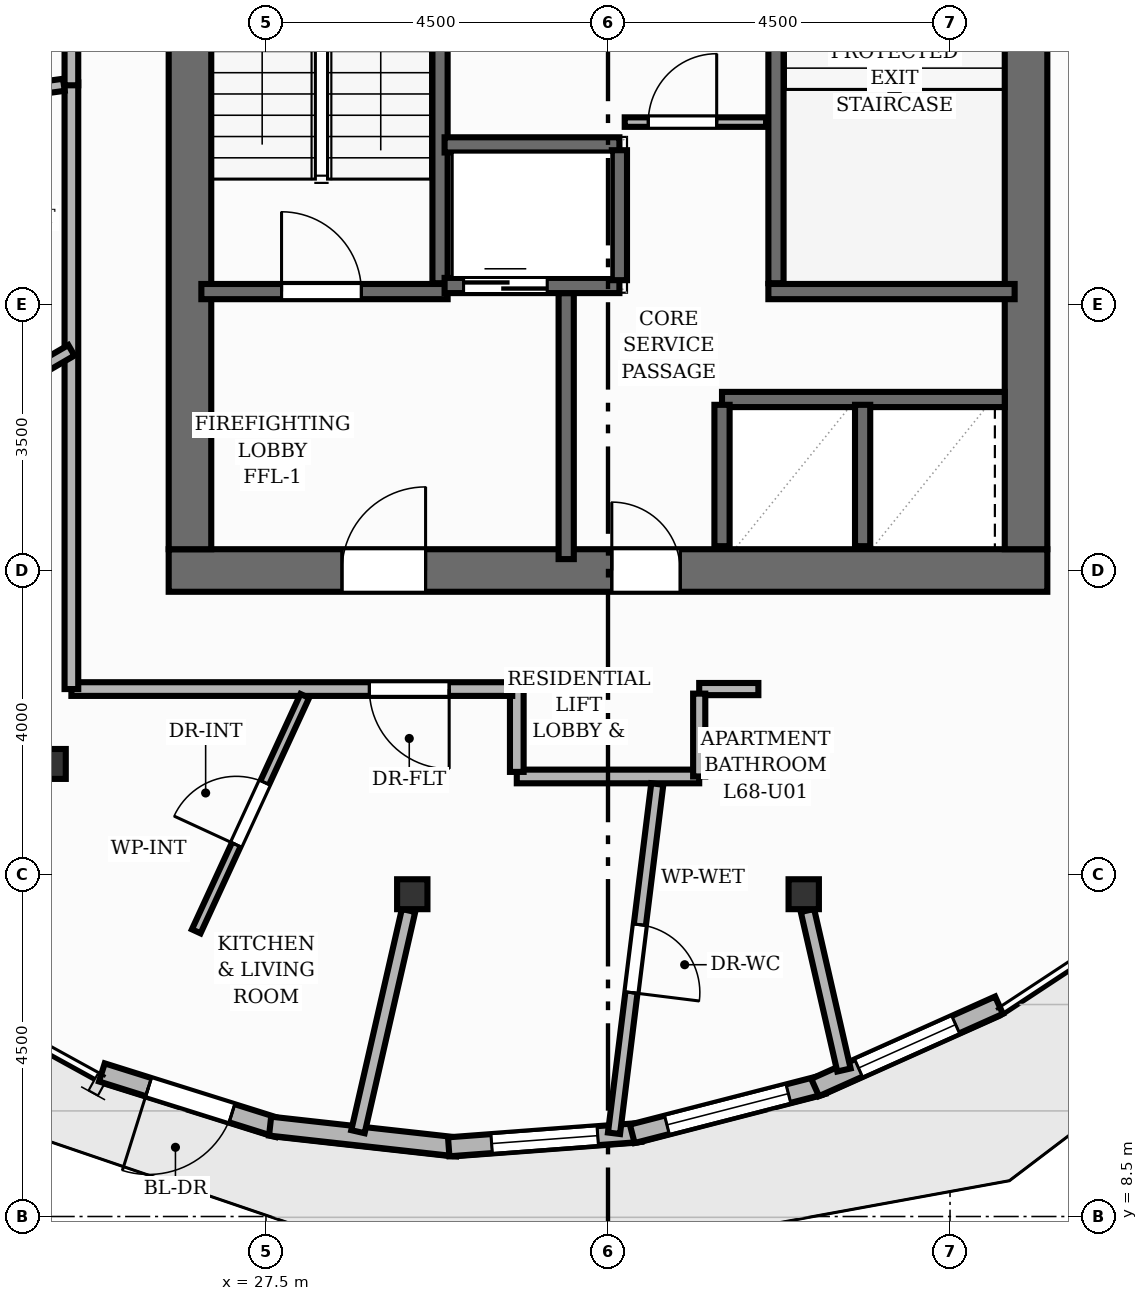
"""IFC4 building model, lengths in metres.
Left out: names, types, materials, properties, quantities, classifications, styles, units other than length and angle.
Written with IfcOpenShell. Run it as: python <this file> out.ifc"""

import sys

from ifc_helpers import new_model, si_unit, direction, frame, frame_2d, origin, origin_2d, place, context, subcontext, project, spatial, rectangle, i_section, extrude, element, fill, save


model = new_model("IFC4")
c1 = context("Model", 3, precision=1e-05, world=origin(), true_north=direction((0.0, 1.0)))
c2 = subcontext(c1, "Body", "Model", "MODEL_VIEW")
j1 = project(units=[si_unit("LENGTHUNIT", "METRE"), si_unit("PLANEANGLEUNIT", "RADIAN")], contexts=[c1])
p1 = place(None, origin())
s1 = spatial("IfcSite", under=j1, at=p1, CompositionType="ELEMENT")
p2 = place(p1, origin())
s2 = spatial("IfcBuilding", under=s1, at=p2, CompositionType="ELEMENT")
p3 = place(p2, frame((0.0, 0.0, 227.04)))
s3 = spatial("IfcBuildingStorey", under=s2, at=p3, CompositionType="ELEMENT", Elevation=227.04)
p4 = place(p3, frame((26.22, 17.0, 0.0), z_axis=(0.0, 0.0, 1.0), x_axis=(1.0, 0.0, 0.0)))
e1 = element("IfcWall", 1, at=p4, inside=s3, PredefinedType="SHEAR", context=c2, shape_type="SweptSolid", body=[
    extrude(rectangle(XDim=11.56, YDim=0.56, at=frame_2d((5.78, 0.0))), origin(), (0.0, 0.0, 1.0), 3.2),
])
p5 = place(p4, frame((2.28, 0.0, 0.0)))
e2 = element("IfcOpeningElement", 2, at=p5, cuts=e1, PredefinedType="OPENING", context=c2, shape_type="SweptSolid", body=[
    extrude(rectangle(XDim=1.1, YDim=2.15, at=frame_2d((0.55, 1.075))), frame((0.0, 0.29, 0.0), z_axis=(0.0, -1.0, 0.0), x_axis=(1.0, 0.0, 0.0)), (0.0, 0.0, 1.0), 0.58),
])
p6 = place(p4, frame((5.83, 0.0, 0.0)))
e3 = element("IfcOpeningElement", 3, at=p6, cuts=e1, PredefinedType="OPENING", context=c2, shape_type="SweptSolid", body=[
    extrude(rectangle(XDim=0.9, YDim=2.1, at=frame_2d((0.45, 1.05))), frame((0.0, 0.29, 0.0), z_axis=(0.0, -1.0, 0.0), x_axis=(1.0, 0.0, 0.0)), (0.0, 0.0, 1.0), 0.58),
])
for number, where, z_axis, x_axis in (
    (4, (26.5, 17.28, 0.0), (0.0, 0.0, 1.0), (0.0, 1.0, 0.0)),
    (5, (37.5, 17.28, 0.0), (0.0, 0.0, 1.0), (0.0, 1.0, 0.0)),
):
    element("IfcWall", number, at=place(p3, frame(where, z_axis=z_axis, x_axis=x_axis)), inside=s3, PredefinedType="SHEAR", context=c2, shape_type="SweptSolid", body=[
        extrude(rectangle(XDim=13.44, YDim=0.56, at=frame_2d((6.72, 0.0))), origin(), (0.0, 0.0, 1.0), 3.2),
    ])
for number, where, z_axis, x_axis in (
    (6, (24.667, 14.455, 0.0), (0.0, 0.0, 1.0), (1.0, 0.0, 0.0)),
    (7, (29.425, 12.74, 0.0), (0.0, 0.0, 1.0), (1.0, 0.0, 0.0)),
    (8, (34.575, 12.74, 0.0), (0.0, 0.0, 1.0), (1.0, 0.0, 0.0)),
):
    element("IfcColumn", number, at=place(p3, frame(where, z_axis=z_axis, x_axis=x_axis)), inside=s3, PredefinedType="COLUMN", context=c2, shape_type="SweptSolid", body=[
        extrude(i_section(OverallWidth=0.399, OverallDepth=0.394, WebThickness=0.023, FlangeThickness=0.037, at=origin_2d()), origin(), (0.0, 0.0, 1.0), 3.2),
    ])
p7 = place(p3, frame((27.666, 9.666, 0.0), z_axis=(0.0, 0.0, 1.0), x_axis=(-0.95407801166, 0.299558254212, 0.0)))
e9 = element("IfcWall", 9, at=p7, inside=s3, PredefinedType="SOLIDWALL", context=c2, shape_type="SweptSolid", body=[
    extrude(rectangle(XDim=2.437, YDim=0.25, at=frame_2d((1.218, 0.0))), origin(), (0.0, 0.0, 1.0), 2.96),
])
p8 = place(p7, frame((0.643, 0.0, 0.0)))
e10 = element("IfcOpeningElement", 10, at=p8, cuts=e9, PredefinedType="OPENING", context=c2, shape_type="SweptSolid", body=[
    extrude(rectangle(XDim=1.15, YDim=2.2, at=frame_2d((0.575, 1.1))), frame((0.0, 0.135, 0.0), z_axis=(0.0, -1.0, 0.0), x_axis=(1.0, 0.0, 0.0)), (0.0, 0.0, 1.0), 0.27),
])
p9 = place(p3, frame((30.017, 9.415, 0.0), z_axis=(0.0, 0.0, 1.0), x_axis=(-0.993859679734, 0.110647806121, 0.0)))
e11 = element("IfcWall", 11, at=p9, inside=s3, PredefinedType="SOLIDWALL", context=c2, shape_type="SweptSolid", body=[
    extrude(rectangle(XDim=2.478, YDim=0.25, at=frame_2d((1.239, 0.0))), origin(), (0.0, 0.0, 1.0), 2.96),
])
p10 = place(p3, frame((32.429, 9.606, 0.0), z_axis=(0.0, 0.0, 1.0), x_axis=(-0.997203982256, -0.074727623888, 0.0)))
e12 = element("IfcWall", 12, at=p10, inside=s3, PredefinedType="SOLIDWALL", context=c2, shape_type="SweptSolid", body=[
    extrude(rectangle(XDim=2.532, YDim=0.25, at=frame_2d((1.266, 0.0))), origin(), (0.0, 0.0, 1.0), 2.96),
])
p11 = place(p10, frame((0.566, 0.0, 0.85)))
e13 = element("IfcOpeningElement", 13, at=p11, cuts=e12, PredefinedType="OPENING", context=c2, shape_type="SweptSolid", body=[
    extrude(rectangle(XDim=1.4, YDim=1.55, at=frame_2d((0.7, 0.775))), frame((0.0, 0.135, 0.0), z_axis=(0.0, -1.0, 0.0), x_axis=(1.0, 0.0, 0.0)), (0.0, 0.0, 1.0), 0.27),
])
p12 = place(p3, frame((34.829, 10.234, 0.0), z_axis=(0.0, 0.0, 1.0), x_axis=(-0.968423445169, -0.249311112562, 0.0)))
e14 = element("IfcWall", 14, at=p12, inside=s3, PredefinedType="SOLIDWALL", context=c2, shape_type="SweptSolid", body=[
    extrude(rectangle(XDim=2.592, YDim=0.25, at=frame_2d((1.296, 0.0))), origin(), (0.0, 0.0, 1.0), 2.96),
])
p13 = place(p12, frame((0.471, 0.0, 0.85)))
e15 = element("IfcOpeningElement", 15, at=p13, cuts=e14, PredefinedType="OPENING", context=c2, shape_type="SweptSolid", body=[
    extrude(rectangle(XDim=1.65, YDim=1.55, at=frame_2d((0.825, 0.775))), frame((0.0, 0.135, 0.0), z_axis=(0.0, -1.0, 0.0), x_axis=(1.0, 0.0, 0.0)), (0.0, 0.0, 1.0), 0.27),
])
p14 = place(p3, frame((37.145, 11.281, 0.0), z_axis=(0.0, 0.0, 1.0), x_axis=(-0.912779399898, -0.408452894617, 0.0)))
e16 = element("IfcWall", 16, at=p14, inside=s3, PredefinedType="SOLIDWALL", context=c2, shape_type="SweptSolid", body=[
    extrude(rectangle(XDim=2.651, YDim=0.25, at=frame_2d((1.325, 0.0))), origin(), (0.0, 0.0, 1.0), 2.96),
])
p15 = place(p14, frame((0.625, 0.0, 0.85)))
e17 = element("IfcOpeningElement", 17, at=p15, cuts=e16, PredefinedType="OPENING", context=c2, shape_type="SweptSolid", body=[
    extrude(rectangle(XDim=1.4, YDim=1.52, at=frame_2d((0.7, 0.76))), frame((0.0, 0.135, 0.0), z_axis=(0.0, -1.0, 0.0), x_axis=(1.0, 0.0, 0.0)), (0.0, 0.0, 1.0), 0.27),
])
p16 = place(p3, frame((29.79, 20.78, 0.0), z_axis=(0.0, 0.0, 1.0), x_axis=(0.0, 1.0, 0.0)))
e18 = element("IfcWall", 18, at=p16, inside=s3, PredefinedType="SHEAR", context=c2, shape_type="SweptSolid", body=[
    extrude(rectangle(XDim=6.44, YDim=0.2, at=frame_2d((3.22, 0.0))), origin(), (0.0, 0.0, 1.0), 3.2),
])
p17 = place(p3, frame((26.65, 20.67, 0.0), z_axis=(0.0, 0.0, 1.0), x_axis=(1.0, 0.0, 0.0)))
e19 = element("IfcWall", 19, at=p17, inside=s3, PredefinedType="SHEAR", context=c2, shape_type="SweptSolid", body=[
    extrude(rectangle(XDim=3.24, YDim=0.2, at=frame_2d((1.62, 0.0))), origin(), (0.0, 0.0, 1.0), 3.2),
])
p18 = place(p17, frame((1.055, 0.0, 0.0)))
e20 = element("IfcOpeningElement", 20, at=p18, cuts=e19, PredefinedType="OPENING", context=c2, shape_type="SweptSolid", body=[
    extrude(rectangle(XDim=1.05, YDim=2.15, at=frame_2d((0.525, 1.075))), frame((0.0, 0.11, 0.0), z_axis=(0.0, -1.0, 0.0), x_axis=(1.0, 0.0, 0.0)), (0.0, 0.0, 1.0), 0.22),
])
p19 = place(p3, frame((34.21, 20.78, 0.0), z_axis=(0.0, 0.0, 1.0), x_axis=(0.0, 1.0, 0.0)))
e21 = element("IfcWall", 21, at=p19, inside=s3, PredefinedType="SHEAR", context=c2, shape_type="SweptSolid", body=[
    extrude(rectangle(XDim=6.44, YDim=0.2, at=frame_2d((3.22, 0.0))), origin(), (0.0, 0.0, 1.0), 3.2),
])
p20 = place(p3, frame((34.11, 20.67, 0.0), z_axis=(0.0, 0.0, 1.0), x_axis=(1.0, 0.0, 0.0)))
e22 = element("IfcWall", 22, at=p20, inside=s3, PredefinedType="SHEAR", context=c2, shape_type="SweptSolid", body=[
    extrude(rectangle(XDim=3.24, YDim=0.2, at=frame_2d((1.62, 0.0))), origin(), (0.0, 0.0, 1.0), 3.2),
])
p21 = place(p3, frame((31.45, 17.15, 0.0), z_axis=(0.0, 0.0, 1.0), x_axis=(0.0, 1.0, 0.0)))
e23 = element("IfcWall", 23, at=p21, inside=s3, PredefinedType="SHEAR", context=c2, shape_type="SweptSolid", body=[
    extrude(rectangle(XDim=3.5, YDim=0.2, at=frame_2d((1.75, 0.0))), origin(), (0.0, 0.0, 1.0), 3.2),
])
p22 = place(p3, frame((29.85, 20.75, 0.0), z_axis=(0.0, 0.0, 1.0), x_axis=(1.0, 0.0, 0.0)))
e24 = element("IfcWall", 24, at=p22, inside=s3, PredefinedType="SHEAR", context=c2, shape_type="SweptSolid", body=[
    extrude(rectangle(XDim=2.3, YDim=0.2, at=frame_2d((1.15, 0.0))), origin(), (0.0, 0.0, 1.0), 3.2),
])
p23 = place(p22, frame((0.25, 0.0, 0.0)))
e25 = element("IfcOpeningElement", 25, at=p23, cuts=e24, PredefinedType="OPENING", context=c2, shape_type="SweptSolid", body=[
    extrude(rectangle(XDim=1.1, YDim=2.15, at=frame_2d((0.55, 1.075))), frame((0.0, 0.11, 0.0), z_axis=(0.0, -1.0, 0.0), x_axis=(1.0, 0.0, 0.0)), (0.0, 0.0, 1.0), 0.22),
])
p24 = place(p3, frame((29.85, 22.6, 0.0), z_axis=(0.0, 0.0, 1.0), x_axis=(1.0, 0.0, 0.0)))
e26 = element("IfcWall", 26, at=p24, inside=s3, PredefinedType="SHEAR", context=c2, shape_type="SweptSolid", body=[
    extrude(rectangle(XDim=2.3, YDim=0.2, at=frame_2d((1.15, 0.0))), origin(), (0.0, 0.0, 1.0), 3.2),
])
p25 = place(p3, frame((32.15, 20.82, 0.0), z_axis=(0.0, 0.0, 1.0), x_axis=(0.0, 1.0, 0.0)))
e27 = element("IfcWall", 27, at=p25, inside=s3, PredefinedType="SHEAR", context=c2, shape_type="SweptSolid", body=[
    extrude(rectangle(XDim=1.71, YDim=0.2, at=frame_2d((0.855, 0.0))), origin(), (0.0, 0.0, 1.0), 3.2),
])
p26 = place(p3, frame((33.5, 19.25, 0.0), z_axis=(0.0, 0.0, 1.0), x_axis=(1.0, 0.0, 0.0)))
e28 = element("IfcWall", 28, at=p26, inside=s3, PredefinedType="SHEAR", context=c2, shape_type="SweptSolid", body=[
    extrude(rectangle(XDim=3.72, YDim=0.2, at=frame_2d((1.86, 0.0))), origin(), (0.0, 0.0, 1.0), 3.2),
])
for number, where, z_axis, x_axis in (
    (29, (33.5, 17.32, 0.0), (0.0, 0.0, 1.0), (0.0, 1.0, 0.0)),
    (30, (35.35, 17.32, 0.0), (0.0, 0.0, 1.0), (0.0, 1.0, 0.0)),
):
    element("IfcWall", number, at=place(p3, frame(where, z_axis=z_axis, x_axis=x_axis)), inside=s3, PredefinedType="SHEAR", context=c2, shape_type="SweptSolid", body=[
        extrude(rectangle(XDim=1.86, YDim=0.2, at=frame_2d((0.93, 0.0))), origin(), (0.0, 0.0, 1.0), 3.2),
    ])
p27 = place(p3, frame((32.22, 22.9, 0.0), z_axis=(0.0, 0.0, 1.0), x_axis=(1.0, 0.0, 0.0)))
e31 = element("IfcWall", 31, at=p27, inside=s3, PredefinedType="PARTITIONING", context=c2, shape_type="SweptSolid", body=[
    extrude(rectangle(XDim=1.86, YDim=0.125, at=frame_2d((0.93, 0.0))), origin(), (0.0, 0.0, 1.0), 2.955),
])
p28 = place(p27, frame((0.31, 0.0, 0.0)))
e32 = element("IfcOpeningElement", 32, at=p28, cuts=e31, PredefinedType="OPENING", context=c2, shape_type="SweptSolid", body=[
    extrude(rectangle(XDim=0.9, YDim=2.1, at=frame_2d((0.45, 1.05))), frame((0.0, 0.073, 0.0), z_axis=(0.0, -1.0, 0.0), x_axis=(1.0, 0.0, 0.0)), (0.0, 0.0, 1.0), 0.145),
])
p29 = place(p3, frame((29.376, 12.527, 0.0), z_axis=(0.0, 0.0, 1.0), x_axis=(-0.222977992513, -0.974823478818, 0.0)))
e33 = element("IfcWall", 33, at=p29, inside=s3, PredefinedType="PARTITIONING", context=c2, shape_type="SweptSolid", body=[
    extrude(rectangle(XDim=2.986, YDim=0.18, at=frame_2d((1.493, 0.0))), origin(), (0.0, 0.0, 1.0), 2.403),
])
p30 = place(p3, frame((34.624, 12.527, 0.0), z_axis=(0.0, 0.0, 1.0), x_axis=(0.223037236672, -0.974809925605, 0.0)))
e34 = element("IfcWall", 34, at=p30, inside=s3, PredefinedType="PARTITIONING", context=c2, shape_type="SweptSolid", body=[
    extrude(rectangle(XDim=2.153, YDim=0.18, at=frame_2d((1.077, 0.0))), origin(), (0.0, 0.0, 1.0), 2.403),
])
p31 = place(p3, frame((33.2, 14.29, 0.0), z_axis=(0.0, 0.0, 1.0), x_axis=(-1.0, 0.0, 0.0)))
e35 = element("IfcWall", 35, at=p31, inside=s3, PredefinedType="PARTITIONING", context=c2, shape_type="SweptSolid", body=[
    extrude(rectangle(XDim=2.4, YDim=0.18, at=frame_2d((1.2, 0.0))), origin(), (0.0, 0.0, 1.0), 2.955),
])
p32 = place(p3, frame((30.8, 14.35, 0.0), z_axis=(0.0, 0.0, 1.0), x_axis=(0.0, 1.0, 0.0)))
e36 = element("IfcWall", 36, at=p32, inside=s3, PredefinedType="PARTITIONING", context=c2, shape_type="SweptSolid", body=[
    extrude(rectangle(XDim=1.09, YDim=0.18, at=frame_2d((0.545, 0.0))), origin(), (0.0, 0.0, 1.0), 2.955),
])
p33 = place(p3, frame((30.74, 15.44, 0.0), z_axis=(0.0, 0.0, 1.0), x_axis=(-1.0, 0.0, 0.0)))
e37 = element("IfcWall", 37, at=p33, inside=s3, PredefinedType="PARTITIONING", context=c2, shape_type="SweptSolid", body=[
    extrude(rectangle(XDim=5.8, YDim=0.18, at=frame_2d((2.9, 0.0))), origin(), (0.0, 0.0, 1.0), 2.955),
])
p34 = place(p33, frame((0.83, 0.0, 0.0)))
e38 = element("IfcOpeningElement", 38, at=p34, cuts=e37, PredefinedType="OPENING", context=c2, shape_type="SweptSolid", body=[
    extrude(rectangle(XDim=1.05, YDim=2.15, at=frame_2d((0.525, 1.075))), frame((0.0, 0.1, 0.0), z_axis=(0.0, -1.0, 0.0), x_axis=(1.0, 0.0, 0.0)), (0.0, 0.0, 1.0), 0.2),
])
p35 = place(p3, frame((33.978, 15.44, 0.0), z_axis=(0.0, 0.0, 1.0), x_axis=(-1.0, 0.0, 0.0)))
e39 = element("IfcWall", 39, at=p35, inside=s3, PredefinedType="PLUMBINGWALL", context=c2, shape_type="SweptSolid", body=[
    extrude(rectangle(XDim=0.778, YDim=0.16, at=frame_2d((0.389, 0.0))), origin(), (0.0, 0.0, 1.0), 2.955),
])
p36 = place(p3, frame((33.2, 15.38, 0.0), z_axis=(0.0, 0.0, 1.0), x_axis=(0.0, -1.0, 0.0)))
e40 = element("IfcWall", 40, at=p36, inside=s3, PredefinedType="PLUMBINGWALL", context=c2, shape_type="SweptSolid", body=[
    extrude(rectangle(XDim=1.09, YDim=0.16, at=frame_2d((0.545, 0.0))), origin(), (0.0, 0.0, 1.0), 2.955),
])
p37 = place(p3, frame((24.94, 15.44, 0.0), z_axis=(0.0, 0.0, 1.0), x_axis=(0.0, 1.0, 0.0)))
e41 = element("IfcWall", 41, at=p37, inside=s3, PredefinedType="PARTITIONING", context=c2, shape_type="SweptSolid", body=[
    extrude(rectangle(XDim=7.982, YDim=0.18, at=frame_2d((3.991, 0.0))), origin(), (0.0, 0.0, 1.0), 2.955),
])
p38 = place(p3, frame((24.94, 23.384, 0.0), z_axis=(0.0, 0.0, 1.0), x_axis=(0.0, 1.0, 0.0)))
e42 = element("IfcWall", 42, at=p38, inside=s3, PredefinedType="PARTITIONING", context=c2, shape_type="SweptSolid", body=[
    extrude(rectangle(XDim=9.176, YDim=0.18, at=frame_2d((4.588, 0.0))), origin(), (0.0, 0.0, 1.0), 2.955),
])
p39 = place(p38, frame((0.872, 0.0, 0.0)))
e43 = element("IfcOpeningElement", 43, at=p39, cuts=e42, PredefinedType="OPENING", context=c2, shape_type="SweptSolid", body=[
    extrude(rectangle(XDim=1.05, YDim=2.15, at=frame_2d((0.525, 1.075))), frame((0.0, 0.1, 0.0), z_axis=(0.0, -1.0, 0.0), x_axis=(1.0, 0.0, 0.0)), (0.0, 0.0, 1.0), 0.2),
])
p40 = place(p3, frame((32.649, 14.191, 0.0), z_axis=(0.0, 0.0, 1.0), x_axis=(-0.122996482144, -0.992407106676, 0.0)))
e44 = element("IfcWall", 44, at=p40, inside=s3, PredefinedType="PLUMBINGWALL", context=c2, shape_type="SweptSolid", body=[
    extrude(rectangle(XDim=4.631, YDim=0.16, at=frame_2d((2.315, 0.0))), origin(), (0.0, 0.0, 1.0), 2.692),
])
p41 = place(p40, frame((1.865, 0.0, 0.0)))
e45 = element("IfcOpeningElement", 45, at=p41, cuts=e44, PredefinedType="OPENING", context=c2, shape_type="SweptSolid", body=[
    extrude(rectangle(XDim=0.9, YDim=2.1, at=frame_2d((0.45, 1.05))), frame((0.0, 0.09, 0.0), z_axis=(0.0, -1.0, 0.0), x_axis=(1.0, 0.0, 0.0)), (0.0, 0.0, 1.0), 0.18),
])
p42 = place(p3, frame((26.583, 12.252, 0.0), z_axis=(0.0, 0.0, 1.0), x_axis=(0.418699522362, 0.908124831713, 0.0)))
e46 = element("IfcWall", 46, at=p42, inside=s3, PredefinedType="PARTITIONING", context=c2, shape_type="SweptSolid", body=[
    extrude(rectangle(XDim=3.41, YDim=0.125, at=frame_2d((1.705, 0.0))), origin(), (0.0, 0.0, 1.0), 2.955),
])
p43 = place(p42, frame((1.255, 0.0, 0.0)))
e47 = element("IfcOpeningElement", 47, at=p43, cuts=e46, PredefinedType="OPENING", context=c2, shape_type="SweptSolid", body=[
    extrude(rectangle(XDim=0.9, YDim=2.1, at=frame_2d((0.45, 1.05))), frame((0.0, 0.073, 0.0), z_axis=(0.0, -1.0, 0.0), x_axis=(1.0, 0.0, 0.0)), (0.0, 0.0, 1.0), 0.145),
])
p44 = place(p3, frame((21.21, 17.729, 0.0), z_axis=(0.0, 0.0, 1.0), x_axis=(0.864584371019, 0.502487676854, 0.0)))
e48 = element("IfcWall", 48, at=p44, inside=s3, PredefinedType="PLUMBINGWALL", context=c2, shape_type="SweptSolid", body=[
    extrude(rectangle(XDim=4.314, YDim=0.16, at=frame_2d((2.157, 0.0))), origin(), (0.0, 0.0, 1.0), 2.403),
])
p45 = place(p3, frame((24.841, 23.391, 0.0), z_axis=(0.0, 0.0, 1.0), x_axis=(-0.990809817729, -0.135262356521, 0.0)))
e49 = element("IfcWall", 49, at=p45, inside=s3, PredefinedType="PLUMBINGWALL", context=c2, shape_type="SweptSolid", body=[
    extrude(rectangle(XDim=2.337, YDim=0.16, at=frame_2d((1.169, 0.0))), origin(), (0.0, 0.0, 1.0), 2.692),
])
p46 = place(p45, frame((0.719, 0.0, 0.0)))
e50 = element("IfcOpeningElement", 50, at=p46, cuts=e49, PredefinedType="OPENING", context=c2, shape_type="SweptSolid", body=[
    extrude(rectangle(XDim=0.9, YDim=2.1, at=frame_2d((0.45, 1.05))), frame((0.0, 0.09, 0.0), z_axis=(0.0, -1.0, 0.0), x_axis=(1.0, 0.0, 0.0)), (0.0, 0.0, 1.0), 0.18),
])
p47 = place(p8, origin())
e51 = element("IfcDoor", 51, at=p47, inside=s3, OperationType="SINGLE_SWING_RIGHT", PredefinedType="DOOR", context=c2, shape_type="SweptSolid", body=[
    extrude(rectangle(XDim=1.15, YDim=2.2, at=frame_2d((0.575, 1.1))), frame((0.0, 0.025, 0.0), z_axis=(0.0, -1.0, 0.0), x_axis=(1.0, 0.0, 0.0)), (0.0, 0.0, 1.0), 0.05),
])
fill(e10, e51)
p48 = place(p11, origin())
e52 = element("IfcWindow", 52, at=p48, inside=s3, PartitioningType="SINGLE_PANEL", PredefinedType="WINDOW", context=c2, shape_type="SweptSolid", body=[
    extrude(rectangle(XDim=1.4, YDim=1.55, at=frame_2d((0.7, 0.775))), frame((0.0, 0.03, 0.0), z_axis=(0.0, -1.0, 0.0), x_axis=(1.0, 0.0, 0.0)), (0.0, 0.0, 1.0), 0.06),
])
fill(e13, e52)
p49 = place(p13, origin())
e53 = element("IfcWindow", 53, at=p49, inside=s3, PartitioningType="SINGLE_PANEL", PredefinedType="WINDOW", context=c2, shape_type="SweptSolid", body=[
    extrude(rectangle(XDim=1.65, YDim=1.55, at=frame_2d((0.825, 0.775))), frame((0.0, 0.03, 0.0), z_axis=(0.0, -1.0, 0.0), x_axis=(1.0, 0.0, 0.0)), (0.0, 0.0, 1.0), 0.06),
])
fill(e15, e53)
p50 = place(p15, origin())
e54 = element("IfcWindow", 54, at=p50, inside=s3, PartitioningType="SINGLE_PANEL", PredefinedType="WINDOW", context=c2, shape_type="SweptSolid", body=[
    extrude(rectangle(XDim=1.4, YDim=1.52, at=frame_2d((0.7, 0.76))), frame((0.0, 0.03, 0.0), z_axis=(0.0, -1.0, 0.0), x_axis=(1.0, 0.0, 0.0)), (0.0, 0.0, 1.0), 0.06),
])
fill(e17, e54)
p51 = place(p18, origin())
e55 = element("IfcDoor", 55, at=p51, inside=s3, OperationType="SINGLE_SWING_LEFT", PredefinedType="DOOR", context=c2, shape_type="SweptSolid", body=[
    extrude(rectangle(XDim=1.05, YDim=2.15, at=frame_2d((0.525, 1.075))), frame((0.0, 0.025, 0.0), z_axis=(0.0, -1.0, 0.0), x_axis=(1.0, 0.0, 0.0)), (0.0, 0.0, 1.0), 0.05),
])
fill(e20, e55)
p52 = place(p5, origin())
e56 = element("IfcDoor", 56, at=p52, inside=s3, OperationType="SINGLE_SWING_RIGHT", PredefinedType="DOOR", context=c2, shape_type="SweptSolid", body=[
    extrude(rectangle(XDim=1.1, YDim=2.15, at=frame_2d((0.55, 1.075))), frame((0.0, 0.025, 0.0), z_axis=(0.0, -1.0, 0.0), x_axis=(1.0, 0.0, 0.0)), (0.0, 0.0, 1.0), 0.05),
])
fill(e2, e56)
p53 = place(p23, origin())
e57 = element("IfcDoor", 57, at=p53, inside=s3, OperationType="DOUBLE_DOOR_SLIDING", PredefinedType="DOOR", context=c2, shape_type="SweptSolid", body=[
    extrude(rectangle(XDim=1.1, YDim=2.15, at=frame_2d((0.55, 1.075))), frame((0.0, 0.025, 0.0), z_axis=(0.0, -1.0, 0.0), x_axis=(1.0, 0.0, 0.0)), (0.0, 0.0, 1.0), 0.05),
])
fill(e25, e57)
p54 = place(p6, origin())
e58 = element("IfcDoor", 58, at=p54, inside=s3, OperationType="SINGLE_SWING_LEFT", PredefinedType="DOOR", context=c2, shape_type="SweptSolid", body=[
    extrude(rectangle(XDim=0.9, YDim=2.1, at=frame_2d((0.45, 1.05))), frame((0.0, 0.025, 0.0), z_axis=(0.0, -1.0, 0.0), x_axis=(1.0, 0.0, 0.0)), (0.0, 0.0, 1.0), 0.05),
])
fill(e3, e58)
p55 = place(p28, origin())
e59 = element("IfcDoor", 59, at=p55, inside=s3, OperationType="SINGLE_SWING_RIGHT", PredefinedType="DOOR", context=c2, shape_type="SweptSolid", body=[
    extrude(rectangle(XDim=0.9, YDim=2.1, at=frame_2d((0.45, 1.05))), frame((0.0, 0.025, 0.0), z_axis=(0.0, -1.0, 0.0), x_axis=(1.0, 0.0, 0.0)), (0.0, 0.0, 1.0), 0.05),
])
fill(e32, e59)
p56 = place(p34, origin())
e60 = element("IfcDoor", 60, at=p56, inside=s3, OperationType="SINGLE_SWING_LEFT", PredefinedType="DOOR", context=c2, shape_type="SweptSolid", body=[
    extrude(rectangle(XDim=1.05, YDim=2.15, at=frame_2d((0.525, 1.075))), frame((0.0, 0.025, 0.0), z_axis=(0.0, -1.0, 0.0), x_axis=(1.0, 0.0, 0.0)), (0.0, 0.0, 1.0), 0.05),
])
fill(e38, e60)
p57 = place(p41, origin())
e61 = element("IfcDoor", 61, at=p57, inside=s3, OperationType="SINGLE_SWING_RIGHT", PredefinedType="DOOR", context=c2, shape_type="SweptSolid", body=[
    extrude(rectangle(XDim=0.9, YDim=2.1, at=frame_2d((0.45, 1.05))), frame((0.0, 0.025, 0.0), z_axis=(0.0, -1.0, 0.0), x_axis=(1.0, 0.0, 0.0)), (0.0, 0.0, 1.0), 0.05),
])
fill(e45, e61)
p58 = place(p43, origin())
e62 = element("IfcDoor", 62, at=p58, inside=s3, OperationType="SINGLE_SWING_LEFT", PredefinedType="DOOR", context=c2, shape_type="SweptSolid", body=[
    extrude(rectangle(XDim=0.9, YDim=2.1, at=frame_2d((0.45, 1.05))), frame((0.0, 0.025, 0.0), z_axis=(0.0, -1.0, 0.0), x_axis=(1.0, 0.0, 0.0)), (0.0, 0.0, 1.0), 0.05),
])
fill(e47, e62)
save(model, sys.argv[1])
